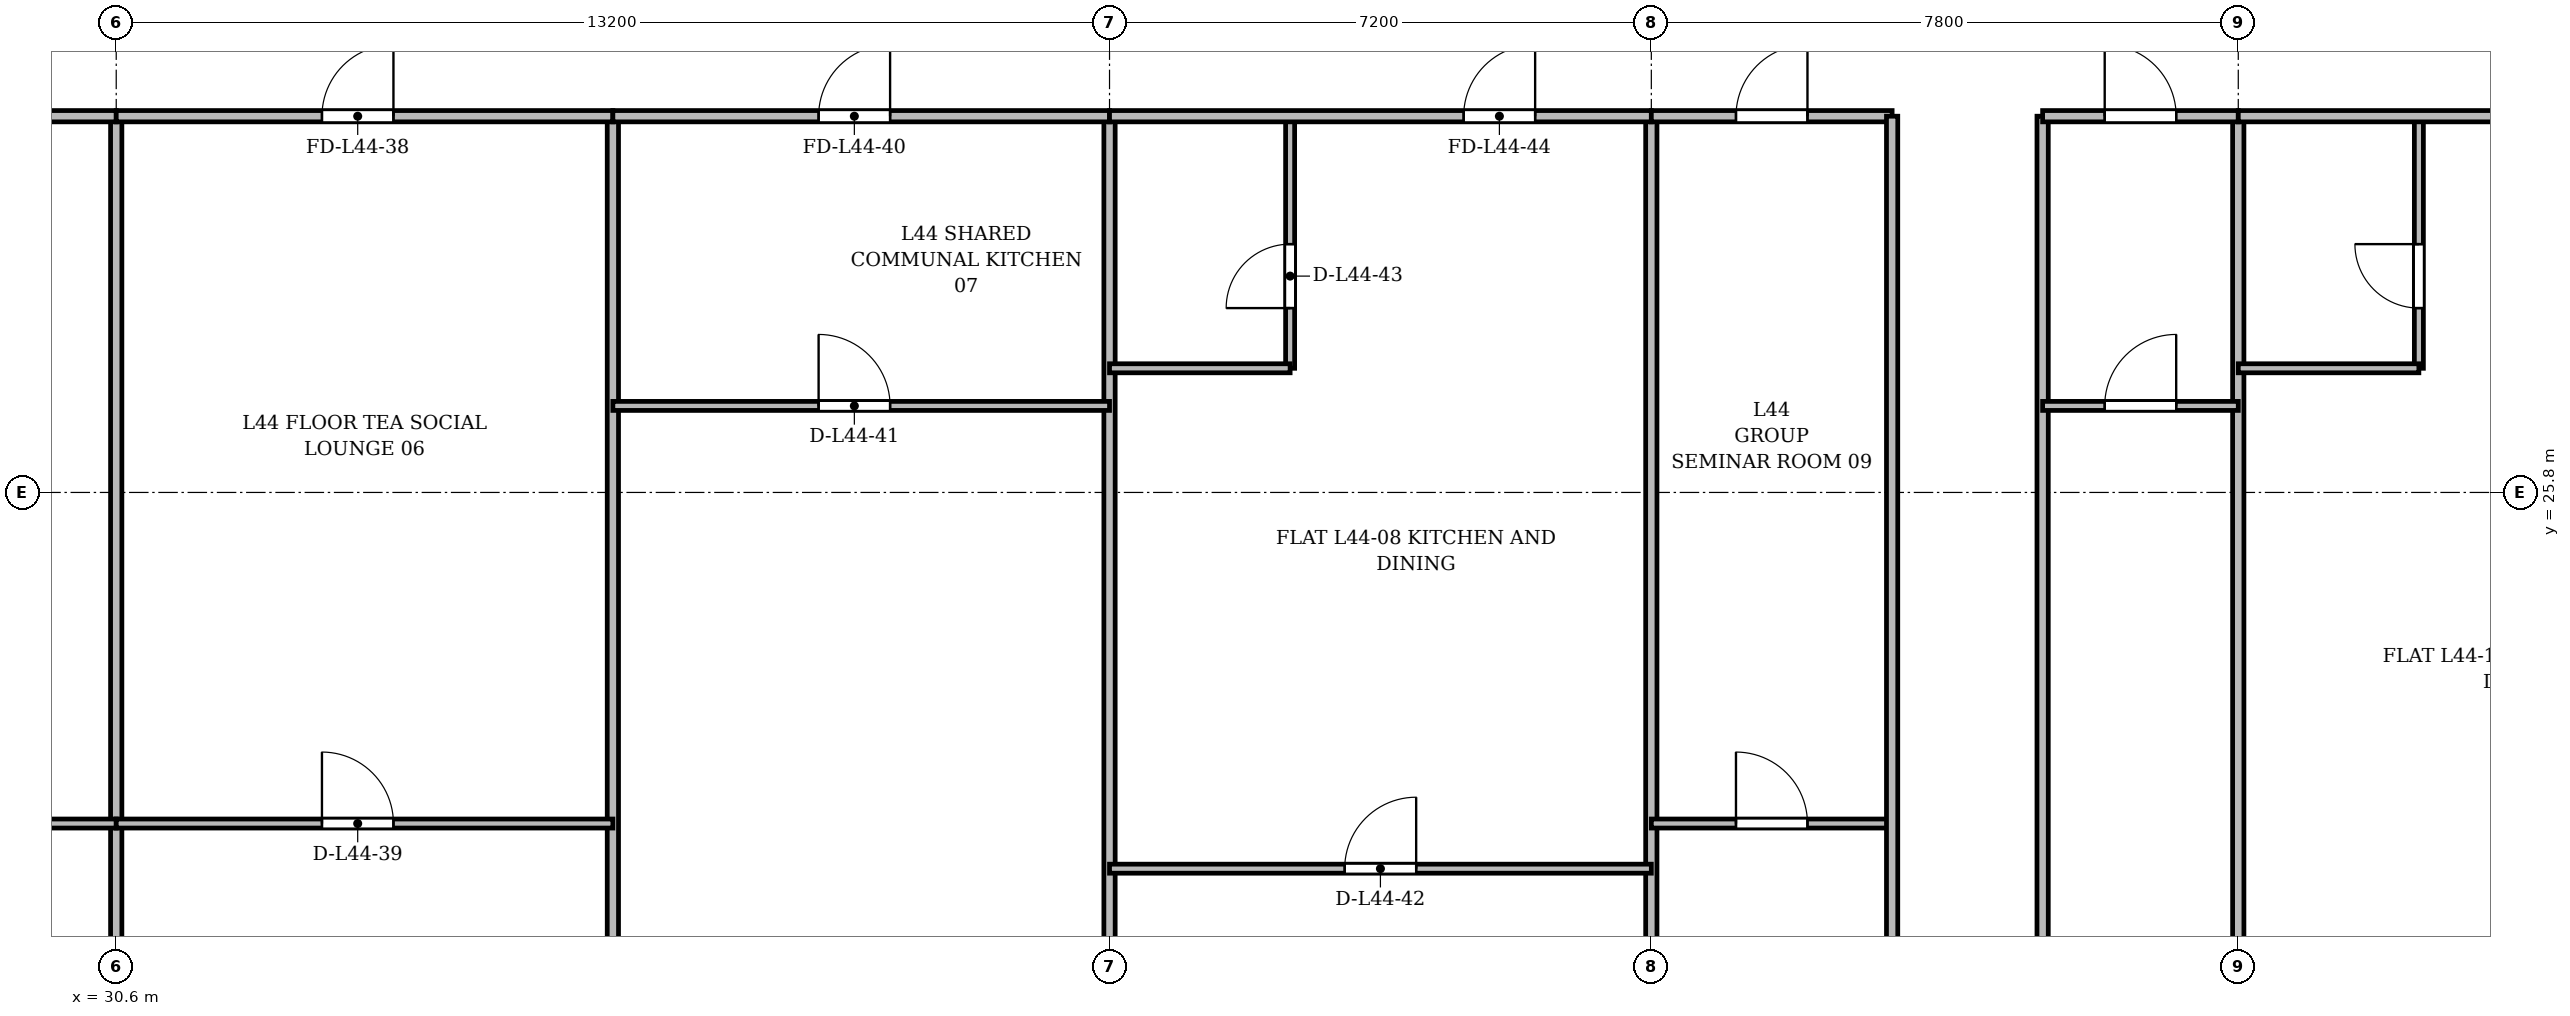
"""IFC4 building model, lengths in metres.
Left out: names, types, materials, properties, quantities, classifications, styles, units other than length and angle.
Written with IfcOpenShell. Run it as: python <this file> out.ifc"""

import sys

from ifc_helpers import new_model, si_unit, direction, frame, frame_2d, origin, place, context, subcontext, project, spatial, rectangle, extrude, source, transform, mapped, element, fill, save


model = new_model("IFC4")
c1 = context("Model", 3, precision=1e-05, world=origin(), true_north=direction((0.0, 1.0)))
c2 = subcontext(c1, "Body", "Model", "MODEL_VIEW")
j1 = project(units=[si_unit("LENGTHUNIT", "METRE"), si_unit("PLANEANGLEUNIT", "RADIAN")], contexts=[c1])
p1 = place(None, origin())
s1 = spatial("IfcSite", under=j1, at=p1, CompositionType="ELEMENT")
p2 = place(p1, origin())
s2 = spatial("IfcBuilding", under=s1, at=p2, CompositionType="ELEMENT")
p3 = place(p2, frame((0.0, 0.0, 168.1)))
s3 = spatial("IfcBuildingStorey", under=s2, at=p3, CompositionType="ELEMENT", Elevation=168.1)
p4 = place(p3, frame((30.6, 3.525, 0.0), z_axis=(0.0, 0.0, 1.0), x_axis=(0.0, 1.0, 0.0)))
e1 = element("IfcWall", 1, at=p4, inside=s3, PredefinedType="PARTITIONING", context=c2, shape_type="SweptSolid", body=[
    extrude(rectangle(XDim=27.275, YDim=0.15, at=frame_2d((13.638, 0.0))), origin(), (0.0, 0.0, 1.0), 2.85),
])
p5 = place(p3, frame((37.2, 3.525, 0.0), z_axis=(0.0, 0.0, 1.0), x_axis=(0.0, 1.0, 0.0)))
e2 = element("IfcWall", 2, at=p5, inside=s3, PredefinedType="PARTITIONING", context=c2, shape_type="SweptSolid", body=[
    extrude(rectangle(XDim=27.275, YDim=0.15, at=frame_2d((13.638, 0.0))), origin(), (0.0, 0.0, 1.0), 2.75),
])
for number, where, z_axis, x_axis in (
    (3, (43.8, 3.525, 0.0), (0.0, 0.0, 1.0), (0.0, 1.0, 0.0)),
    (4, (51.0, 3.525, 0.0), (0.0, 0.0, 1.0), (0.0, 1.0, 0.0)),
    (5, (58.8, 3.525, 0.0), (0.0, 0.0, 1.0), (0.0, 1.0, 0.0)),
):
    element("IfcWall", number, at=place(p3, frame(where, z_axis=z_axis, x_axis=x_axis)), inside=s3, PredefinedType="PARTITIONING", context=c2, shape_type="SweptSolid", body=[
        extrude(rectangle(XDim=27.275, YDim=0.15, at=frame_2d((13.638, 0.0))), origin(), (0.0, 0.0, 1.0), 2.85),
    ])
p6 = place(p3, frame((23.4, 30.8, 0.0), z_axis=(0.0, 0.0, 1.0), x_axis=(1.0, 0.0, 0.0)))
e6 = element("IfcWall", 6, at=p6, inside=s3, PredefinedType="PARTITIONING", context=c2, shape_type="SweptSolid", body=[
    extrude(rectangle(XDim=7.2, YDim=0.15, at=frame_2d((3.6, 0.0))), origin(), (0.0, 0.0, 1.0), 2.85),
])
p7 = place(p6, frame((3.125, 0.0, 0.0)))
e7 = element("IfcOpeningElement", 7, at=p7, cuts=e6, PredefinedType="OPENING", context=c2, shape_type="SweptSolid", body=[
    extrude(rectangle(XDim=0.95, YDim=2.15, at=frame_2d((0.475, 1.075))), frame((0.0, 0.085, 0.0), z_axis=(0.0, -1.0, 0.0), x_axis=(1.0, 0.0, 0.0)), (0.0, 0.0, 1.0), 0.17),
])
p8 = place(p3, frame((23.4, 21.4, 0.0), z_axis=(0.0, 0.0, 1.0), x_axis=(1.0, 0.0, 0.0)))
e8 = element("IfcWall", 8, at=p8, inside=s3, PredefinedType="PARTITIONING", context=c2, shape_type="SweptSolid", body=[
    extrude(rectangle(XDim=7.2, YDim=0.12, at=frame_2d((3.6, 0.0))), origin(), (0.0, 0.0, 1.0), 2.85),
])
p9 = place(p8, frame((3.125, 0.0, 0.0)))
e9 = element("IfcOpeningElement", 9, at=p9, cuts=e8, PredefinedType="OPENING", context=c2, shape_type="SweptSolid", body=[
    extrude(rectangle(XDim=0.95, YDim=2.15, at=frame_2d((0.475, 1.075))), frame((0.0, 0.07, 0.0), z_axis=(0.0, -1.0, 0.0), x_axis=(1.0, 0.0, 0.0)), (0.0, 0.0, 1.0), 0.14),
])
p10 = place(p3, frame((30.6, 30.8, 0.0), z_axis=(0.0, 0.0, 1.0), x_axis=(1.0, 0.0, 0.0)))
e10 = element("IfcWall", 10, at=p10, inside=s3, PredefinedType="PARTITIONING", context=c2, shape_type="SweptSolid", body=[
    extrude(rectangle(XDim=6.6, YDim=0.15, at=frame_2d((3.3, 0.0))), origin(), (0.0, 0.0, 1.0), 2.85),
])
p11 = place(p10, frame((2.734, 0.0, 0.0)))
e11 = element("IfcOpeningElement", 11, at=p11, cuts=e10, PredefinedType="OPENING", context=c2, shape_type="SweptSolid", body=[
    extrude(rectangle(XDim=0.95, YDim=2.15, at=frame_2d((0.475, 1.075))), frame((0.0, 0.085, 0.0), z_axis=(0.0, -1.0, 0.0), x_axis=(1.0, 0.0, 0.0)), (0.0, 0.0, 1.0), 0.17),
])
p12 = place(p3, frame((30.6, 21.4, 0.0), z_axis=(0.0, 0.0, 1.0), x_axis=(1.0, 0.0, 0.0)))
e12 = element("IfcWall", 12, at=p12, inside=s3, PredefinedType="PARTITIONING", context=c2, shape_type="SweptSolid", body=[
    extrude(rectangle(XDim=6.6, YDim=0.12, at=frame_2d((3.3, 0.0))), origin(), (0.0, 0.0, 1.0), 2.85),
])
p13 = place(p12, frame((2.734, 0.0, 0.0)))
e13 = element("IfcOpeningElement", 13, at=p13, cuts=e12, PredefinedType="OPENING", context=c2, shape_type="SweptSolid", body=[
    extrude(rectangle(XDim=0.95, YDim=2.15, at=frame_2d((0.475, 1.075))), frame((0.0, 0.07, 0.0), z_axis=(0.0, -1.0, 0.0), x_axis=(1.0, 0.0, 0.0)), (0.0, 0.0, 1.0), 0.14),
])
p14 = place(p3, frame((37.2, 30.8, 0.0), z_axis=(0.0, 0.0, 1.0), x_axis=(1.0, 0.0, 0.0)))
e14 = element("IfcWall", 14, at=p14, inside=s3, PredefinedType="PARTITIONING", context=c2, shape_type="SweptSolid", body=[
    extrude(rectangle(XDim=6.6, YDim=0.15, at=frame_2d((3.3, 0.0))), origin(), (0.0, 0.0, 1.0), 2.85),
])
p15 = place(p14, frame((2.734, 0.0, 0.0)))
e15 = element("IfcOpeningElement", 15, at=p15, cuts=e14, PredefinedType="OPENING", context=c2, shape_type="SweptSolid", body=[
    extrude(rectangle(XDim=0.95, YDim=2.15, at=frame_2d((0.475, 1.075))), frame((0.0, 0.085, 0.0), z_axis=(0.0, -1.0, 0.0), x_axis=(1.0, 0.0, 0.0)), (0.0, 0.0, 1.0), 0.17),
])
p16 = place(p3, frame((37.2, 26.95, 0.0), z_axis=(0.0, 0.0, 1.0), x_axis=(1.0, 0.0, 0.0)))
e16 = element("IfcWall", 16, at=p16, inside=s3, PredefinedType="PARTITIONING", context=c2, shape_type="SweptSolid", body=[
    extrude(rectangle(XDim=6.6, YDim=0.12, at=frame_2d((3.3, 0.0))), origin(), (0.0, 0.0, 1.0), 2.85),
])
p17 = place(p16, frame((2.734, 0.0, 0.0)))
e17 = element("IfcOpeningElement", 17, at=p17, cuts=e16, PredefinedType="OPENING", context=c2, shape_type="SweptSolid", body=[
    extrude(rectangle(XDim=0.95, YDim=2.15, at=frame_2d((0.475, 1.075))), frame((0.0, 0.07, 0.0), z_axis=(0.0, -1.0, 0.0), x_axis=(1.0, 0.0, 0.0)), (0.0, 0.0, 1.0), 0.14),
])
p18 = place(p3, frame((43.8, 20.8, 0.0), z_axis=(0.0, 0.0, 1.0), x_axis=(1.0, 0.0, 0.0)))
e18 = element("IfcWall", 18, at=p18, inside=s3, PredefinedType="PARTITIONING", context=c2, shape_type="SweptSolid", body=[
    extrude(rectangle(XDim=7.2, YDim=0.12, at=frame_2d((3.6, 0.0))), origin(), (0.0, 0.0, 1.0), 2.85),
])
p19 = place(p18, frame((3.125, 0.0, 0.0)))
e19 = element("IfcOpeningElement", 19, at=p19, cuts=e18, PredefinedType="OPENING", context=c2, shape_type="SweptSolid", body=[
    extrude(rectangle(XDim=0.95, YDim=2.15, at=frame_2d((0.475, 1.075))), frame((0.0, 0.07, 0.0), z_axis=(0.0, -1.0, 0.0), x_axis=(1.0, 0.0, 0.0)), (0.0, 0.0, 1.0), 0.14),
])
p20 = place(p3, frame((46.2, 27.45, 0.0), z_axis=(0.0, 0.0, 1.0), x_axis=(0.0, 1.0, 0.0)))
e20 = element("IfcWall", 20, at=p20, inside=s3, PredefinedType="PARTITIONING", context=c2, shape_type="SweptSolid", body=[
    extrude(rectangle(XDim=3.35, YDim=0.12, at=frame_2d((1.675, 0.0))), origin(), (0.0, 0.0, 1.0), 3.35),
])
p21 = place(p20, frame((0.8, 0.0, 0.0)))
e21 = element("IfcOpeningElement", 21, at=p21, cuts=e20, PredefinedType="OPENING", context=c2, shape_type="SweptSolid", body=[
    extrude(rectangle(XDim=0.85, YDim=2.1, at=frame_2d((0.425, 1.05))), frame((0.0, 0.07, 0.0), z_axis=(0.0, -1.0, 0.0), x_axis=(1.0, 0.0, 0.0)), (0.0, 0.0, 1.0), 0.14),
])
p22 = place(p3, frame((43.8, 27.45, 0.0), z_axis=(0.0, 0.0, 1.0), x_axis=(1.0, 0.0, 0.0)))
e22 = element("IfcWall", 22, at=p22, inside=s3, PredefinedType="PARTITIONING", context=c2, shape_type="SweptSolid", body=[
    extrude(rectangle(XDim=2.4, YDim=0.12, at=frame_2d((1.2, 0.0))), origin(), (0.0, 0.0, 1.0), 2.85),
])
p23 = place(p3, frame((43.8, 30.8, 0.0), z_axis=(0.0, 0.0, 1.0), x_axis=(1.0, 0.0, 0.0)))
e23 = element("IfcWall", 23, at=p23, inside=s3, PredefinedType="PARTITIONING", context=c2, shape_type="SweptSolid", body=[
    extrude(rectangle(XDim=7.2, YDim=0.15, at=frame_2d((3.6, 0.0))), origin(), (0.0, 0.0, 1.0), 2.85),
])
p24 = place(p23, frame((4.706, 0.0, 0.0)))
e24 = element("IfcOpeningElement", 24, at=p24, cuts=e23, PredefinedType="OPENING", context=c2, shape_type="SweptSolid", body=[
    extrude(rectangle(XDim=0.95, YDim=2.15, at=frame_2d((0.475, 1.075))), frame((0.0, 0.085, 0.0), z_axis=(0.0, -1.0, 0.0), x_axis=(1.0, 0.0, 0.0)), (0.0, 0.0, 1.0), 0.17),
])
p25 = place(p3, frame((51.0, 30.8, 0.0), z_axis=(0.0, 0.0, 1.0), x_axis=(1.0, 0.0, 0.0)))
e25 = element("IfcWall", 25, at=p25, inside=s3, PredefinedType="PARTITIONING", context=c2, shape_type="SweptSolid", body=[
    extrude(rectangle(XDim=3.2, YDim=0.15, at=frame_2d((1.6, 0.0))), origin(), (0.0, 0.0, 1.0), 2.85),
])
p26 = place(p25, frame((1.125, 0.0, 0.0)))
e26 = element("IfcOpeningElement", 26, at=p26, cuts=e25, PredefinedType="OPENING", context=c2, shape_type="SweptSolid", body=[
    extrude(rectangle(XDim=0.95, YDim=2.15, at=frame_2d((0.475, 1.075))), frame((0.0, 0.085, 0.0), z_axis=(0.0, -1.0, 0.0), x_axis=(1.0, 0.0, 0.0)), (0.0, 0.0, 1.0), 0.17),
])
p27 = place(p3, frame((51.0, 21.4, 0.0), z_axis=(0.0, 0.0, 1.0), x_axis=(1.0, 0.0, 0.0)))
e27 = element("IfcWall", 27, at=p27, inside=s3, PredefinedType="PARTITIONING", context=c2, shape_type="SweptSolid", body=[
    extrude(rectangle(XDim=3.2, YDim=0.12, at=frame_2d((1.6, 0.0))), origin(), (0.0, 0.0, 1.0), 2.85),
])
p28 = place(p27, frame((1.125, 0.0, 0.0)))
e28 = element("IfcOpeningElement", 28, at=p28, cuts=e27, PredefinedType="OPENING", context=c2, shape_type="SweptSolid", body=[
    extrude(rectangle(XDim=0.95, YDim=2.15, at=frame_2d((0.475, 1.075))), frame((0.0, 0.07, 0.0), z_axis=(0.0, -1.0, 0.0), x_axis=(1.0, 0.0, 0.0)), (0.0, 0.0, 1.0), 0.14),
])
for number, where, z_axis, x_axis in (
    (29, (54.2, 3.525, 0.0), (0.0, 0.0, 1.0), (0.0, 1.0, 0.0)),
    (30, (56.2, 3.525, 0.0), (0.0, 0.0, 1.0), (0.0, 1.0, 0.0)),
):
    element("IfcWall", number, at=place(p3, frame(where, z_axis=z_axis, x_axis=x_axis)), inside=s3, PredefinedType="PARTITIONING", context=c2, shape_type="SweptSolid", body=[
        extrude(rectangle(XDim=27.275, YDim=0.15, at=frame_2d((13.638, 0.0))), origin(), (0.0, 0.0, 1.0), 2.75),
    ])
p29 = place(p3, frame((56.2, 30.8, 0.0), z_axis=(0.0, 0.0, 1.0), x_axis=(1.0, 0.0, 0.0)))
e31 = element("IfcWall", 31, at=p29, inside=s3, PredefinedType="PARTITIONING", context=c2, shape_type="SweptSolid", body=[
    extrude(rectangle(XDim=2.6, YDim=0.15, at=frame_2d((1.3, 0.0))), origin(), (0.0, 0.0, 1.0), 2.85),
])
p30 = place(p29, frame((0.825, 0.0, 0.0)))
e32 = element("IfcOpeningElement", 32, at=p30, cuts=e31, PredefinedType="OPENING", context=c2, shape_type="SweptSolid", body=[
    extrude(rectangle(XDim=0.95, YDim=2.15, at=frame_2d((0.475, 1.075))), frame((0.0, 0.085, 0.0), z_axis=(0.0, -1.0, 0.0), x_axis=(1.0, 0.0, 0.0)), (0.0, 0.0, 1.0), 0.17),
])
p31 = place(p3, frame((56.2, 26.95, 0.0), z_axis=(0.0, 0.0, 1.0), x_axis=(1.0, 0.0, 0.0)))
e33 = element("IfcWall", 33, at=p31, inside=s3, PredefinedType="PARTITIONING", context=c2, shape_type="SweptSolid", body=[
    extrude(rectangle(XDim=2.6, YDim=0.12, at=frame_2d((1.3, 0.0))), origin(), (0.0, 0.0, 1.0), 2.85),
])
p32 = place(p31, frame((0.825, 0.0, 0.0)))
e34 = element("IfcOpeningElement", 34, at=p32, cuts=e33, PredefinedType="OPENING", context=c2, shape_type="SweptSolid", body=[
    extrude(rectangle(XDim=0.95, YDim=2.15, at=frame_2d((0.475, 1.075))), frame((0.0, 0.07, 0.0), z_axis=(0.0, -1.0, 0.0), x_axis=(1.0, 0.0, 0.0)), (0.0, 0.0, 1.0), 0.14),
])
p33 = place(p3, frame((61.2, 27.45, 0.0), z_axis=(0.0, 0.0, 1.0), x_axis=(0.0, 1.0, 0.0)))
e35 = element("IfcWall", 35, at=p33, inside=s3, PredefinedType="PARTITIONING", context=c2, shape_type="SweptSolid", body=[
    extrude(rectangle(XDim=3.35, YDim=0.12, at=frame_2d((1.675, 0.0))), origin(), (0.0, 0.0, 1.0), 3.35),
])
p34 = place(p33, frame((0.8, 0.0, 0.0)))
e36 = element("IfcOpeningElement", 36, at=p34, cuts=e35, PredefinedType="OPENING", context=c2, shape_type="SweptSolid", body=[
    extrude(rectangle(XDim=0.85, YDim=2.1, at=frame_2d((0.425, 1.05))), frame((0.0, 0.07, 0.0), z_axis=(0.0, -1.0, 0.0), x_axis=(1.0, 0.0, 0.0)), (0.0, 0.0, 1.0), 0.14),
])
p35 = place(p3, frame((58.8, 27.45, 0.0), z_axis=(0.0, 0.0, 1.0), x_axis=(1.0, 0.0, 0.0)))
e37 = element("IfcWall", 37, at=p35, inside=s3, PredefinedType="PARTITIONING", context=c2, shape_type="SweptSolid", body=[
    extrude(rectangle(XDim=2.4, YDim=0.12, at=frame_2d((1.2, 0.0))), origin(), (0.0, 0.0, 1.0), 2.85),
])
p36 = place(p3, frame((58.8, 30.8, 0.0), z_axis=(0.0, 0.0, 1.0), x_axis=(1.0, 0.0, 0.0)))
e38 = element("IfcWall", 38, at=p36, inside=s3, PredefinedType="PARTITIONING", context=c2, shape_type="SweptSolid", body=[
    extrude(rectangle(XDim=7.575, YDim=0.15, at=frame_2d((3.788, 0.0))), origin(), (0.0, 0.0, 1.0), 2.85),
])
p37 = place(p36, frame((5.073, 0.0, 0.0)))
e39 = element("IfcOpeningElement", 39, at=p37, cuts=e38, PredefinedType="OPENING", context=c2, shape_type="SweptSolid", body=[
    extrude(rectangle(XDim=0.95, YDim=2.15, at=frame_2d((0.475, 1.075))), frame((0.0, 0.085, 0.0), z_axis=(0.0, -1.0, 0.0), x_axis=(1.0, 0.0, 0.0)), (0.0, 0.0, 1.0), 0.17),
])
m1 = source(origin(), c2, "Body", "SweptSolid", [
    extrude(rectangle(XDim=0.95, YDim=2.15, at=frame_2d((0.475, 1.075))), frame((0.0, 0.025, 0.0), z_axis=(0.0, -1.0, 0.0), x_axis=(1.0, 0.0, 0.0)), (0.0, 0.0, 1.0), 0.05),
])
p38 = place(p11, origin())
e40 = element("IfcDoor", 40, at=p38, inside=s3, OperationType="SINGLE_SWING_RIGHT", PredefinedType="DOOR", context=c2, shape_type="MappedRepresentation", body=[
    mapped(m1, transform((0.0, 0.0, 0.0), x_axis=(1.0, 0.0, 0.0), y_axis=(0.0, 1.0, 0.0), z_axis=(0.0, 0.0, 1.0), scale=1.0)),
])
fill(e11, e40)
p39 = place(p13, origin())
e41 = element("IfcDoor", 41, at=p39, inside=s3, OperationType="SINGLE_SWING_LEFT", PredefinedType="DOOR", context=c2, shape_type="MappedRepresentation", body=[
    mapped(m1, transform((0.0, 0.0, 0.0), x_axis=(1.0, 0.0, 0.0), y_axis=(0.0, 1.0, 0.0), z_axis=(0.0, 0.0, 1.0), scale=1.0)),
])
fill(e13, e41)
p40 = place(p15, origin())
e42 = element("IfcDoor", 42, at=p40, inside=s3, OperationType="SINGLE_SWING_RIGHT", PredefinedType="DOOR", context=c2, shape_type="MappedRepresentation", body=[
    mapped(m1, transform((0.0, 0.0, 0.0), x_axis=(1.0, 0.0, 0.0), y_axis=(0.0, 1.0, 0.0), z_axis=(0.0, 0.0, 1.0), scale=1.0)),
])
fill(e15, e42)
p41 = place(p17, origin())
e43 = element("IfcDoor", 43, at=p41, inside=s3, OperationType="SINGLE_SWING_LEFT", PredefinedType="DOOR", context=c2, shape_type="MappedRepresentation", body=[
    mapped(m1, transform((0.0, 0.0, 0.0), x_axis=(1.0, 0.0, 0.0), y_axis=(0.0, 1.0, 0.0), z_axis=(0.0, 0.0, 1.0), scale=1.0)),
])
fill(e17, e43)
p42 = place(p19, origin())
e44 = element("IfcDoor", 44, at=p42, inside=s3, OperationType="SINGLE_SWING_RIGHT", PredefinedType="DOOR", context=c2, shape_type="MappedRepresentation", body=[
    mapped(m1, transform((0.0, 0.0, 0.0), x_axis=(1.0, 0.0, 0.0), y_axis=(0.0, 1.0, 0.0), z_axis=(0.0, 0.0, 1.0), scale=1.0)),
])
fill(e19, e44)
m2 = source(origin(), c2, "Body", "SweptSolid", [
    extrude(rectangle(XDim=0.85, YDim=2.1, at=frame_2d((0.425, 1.05))), frame((0.0, 0.025, 0.0), z_axis=(0.0, -1.0, 0.0), x_axis=(1.0, 0.0, 0.0)), (0.0, 0.0, 1.0), 0.05),
])
p43 = place(p21, origin())
e45 = element("IfcDoor", 45, at=p43, inside=s3, OperationType="SINGLE_SWING_LEFT", PredefinedType="DOOR", context=c2, shape_type="MappedRepresentation", body=[
    mapped(m2, transform((0.0, 0.0, 0.0), x_axis=(1.0, 0.0, 0.0), y_axis=(0.0, 1.0, 0.0), z_axis=(0.0, 0.0, 1.0), scale=1.0)),
])
fill(e21, e45)
p44 = place(p24, origin())
e46 = element("IfcDoor", 46, at=p44, inside=s3, OperationType="SINGLE_SWING_RIGHT", PredefinedType="DOOR", context=c2, shape_type="MappedRepresentation", body=[
    mapped(m1, transform((0.0, 0.0, 0.0), x_axis=(1.0, 0.0, 0.0), y_axis=(0.0, 1.0, 0.0), z_axis=(0.0, 0.0, 1.0), scale=1.0)),
])
fill(e24, e46)
p45 = place(p26, origin())
e47 = element("IfcDoor", 47, at=p45, inside=s3, OperationType="SINGLE_SWING_RIGHT", PredefinedType="DOOR", context=c2, shape_type="MappedRepresentation", body=[
    mapped(m1, transform((0.0, 0.0, 0.0), x_axis=(1.0, 0.0, 0.0), y_axis=(0.0, 1.0, 0.0), z_axis=(0.0, 0.0, 1.0), scale=1.0)),
])
fill(e26, e47)
p46 = place(p28, origin())
e48 = element("IfcDoor", 48, at=p46, inside=s3, OperationType="SINGLE_SWING_LEFT", PredefinedType="DOOR", context=c2, shape_type="MappedRepresentation", body=[
    mapped(m1, transform((0.0, 0.0, 0.0), x_axis=(1.0, 0.0, 0.0), y_axis=(0.0, 1.0, 0.0), z_axis=(0.0, 0.0, 1.0), scale=1.0)),
])
fill(e28, e48)
p47 = place(p30, origin())
e49 = element("IfcDoor", 49, at=p47, inside=s3, OperationType="SINGLE_SWING_LEFT", PredefinedType="DOOR", context=c2, shape_type="MappedRepresentation", body=[
    mapped(m1, transform((0.0, 0.0, 0.0), x_axis=(1.0, 0.0, 0.0), y_axis=(0.0, 1.0, 0.0), z_axis=(0.0, 0.0, 1.0), scale=1.0)),
])
fill(e32, e49)
p48 = place(p32, origin())
e50 = element("IfcDoor", 50, at=p48, inside=s3, OperationType="SINGLE_SWING_RIGHT", PredefinedType="DOOR", context=c2, shape_type="MappedRepresentation", body=[
    mapped(m1, transform((0.0, 0.0, 0.0), x_axis=(1.0, 0.0, 0.0), y_axis=(0.0, 1.0, 0.0), z_axis=(0.0, 0.0, 1.0), scale=1.0)),
])
fill(e34, e50)
p49 = place(p34, origin())
e51 = element("IfcDoor", 51, at=p49, inside=s3, OperationType="SINGLE_SWING_RIGHT", PredefinedType="DOOR", context=c2, shape_type="MappedRepresentation", body=[
    mapped(m2, transform((0.0, 0.0, 0.0), x_axis=(1.0, 0.0, 0.0), y_axis=(0.0, 1.0, 0.0), z_axis=(0.0, 0.0, 1.0), scale=1.0)),
])
fill(e36, e51)
save(model, sys.argv[1])
